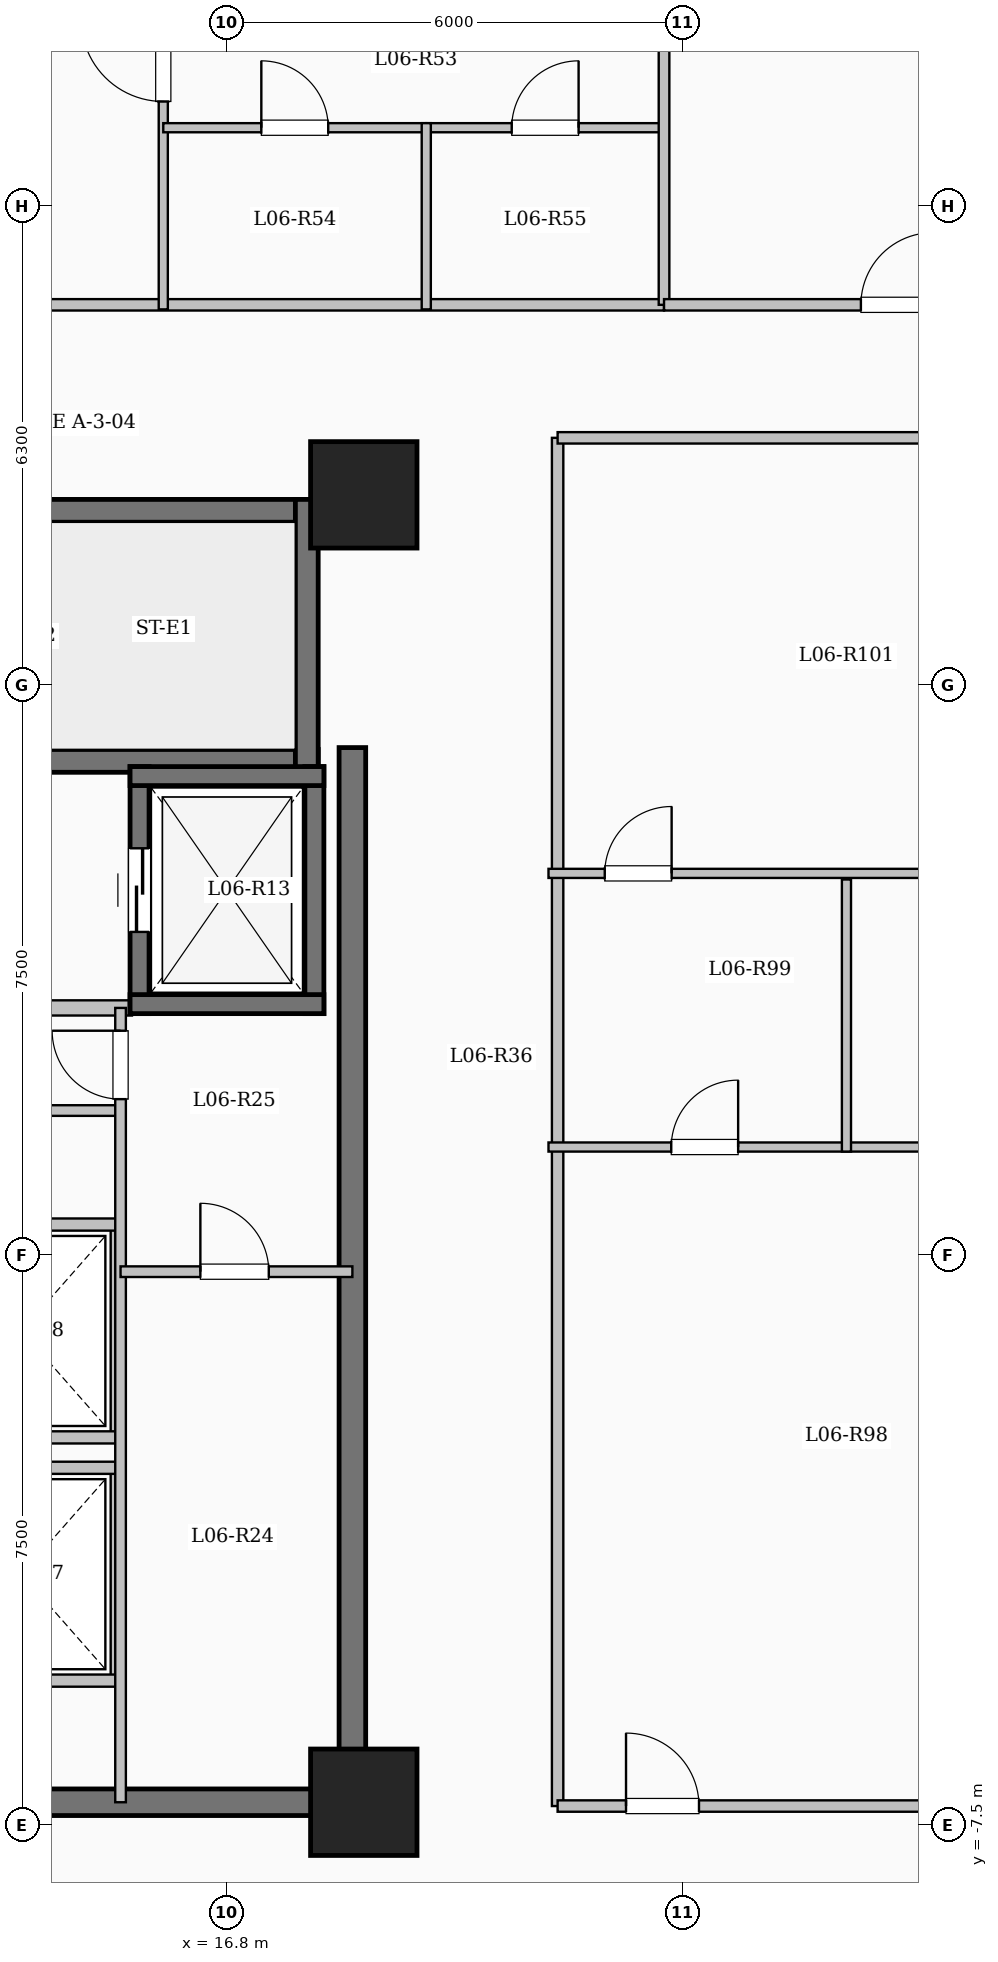
"""IFC4 building model, lengths in metres.
Left out: names, types, materials, properties, quantities, classifications, styles, units other than length and angle.
Written with IfcOpenShell. Run it as: python <this file> out.ifc"""

import sys

from ifc_helpers import new_model, si_unit, direction, frame, frame_2d, origin, origin_2d, place, context, subcontext, project, spatial, rectangle, extrude, element, fill, save


model = new_model("IFC4")
c1 = context("Model", 3, precision=1e-05, world=origin(), true_north=direction((0.0, 1.0)))
c2 = subcontext(c1, "Body", "Model", "MODEL_VIEW")
j1 = project(units=[si_unit("LENGTHUNIT", "METRE"), si_unit("PLANEANGLEUNIT", "RADIAN")], contexts=[c1])
p1 = place(None, origin())
s1 = spatial("IfcSite", under=j1, at=p1, CompositionType="ELEMENT")
p2 = place(p1, origin())
s2 = spatial("IfcBuilding", under=s1, at=p2, CompositionType="ELEMENT")
p3 = place(p2, frame((0.0, 0.0, 27.35)))
s3 = spatial("IfcBuildingStorey", under=s2, at=p3, CompositionType="ELEMENT", Elevation=27.35)
for number, where, z_axis, x_axis in (
    (1, (18.6, -7.2, 0.0), (0.0, 0.0, 1.0), (1.0, 0.0, 0.0)),
    (2, (18.6, 10.0, 0.0), (0.0, 0.0, 1.0), (1.0, 0.0, 0.0)),
):
    element("IfcColumn", number, at=place(p3, frame(where, z_axis=z_axis, x_axis=x_axis)), inside=s3, PredefinedType="COLUMN", context=c2, shape_type="SweptSolid", body=[
        extrude(rectangle(XDim=1.4, YDim=1.4, at=origin_2d()), origin(), (0.0, 0.0, 1.0), 3.35),
    ])
p4 = place(p3, frame((10.0, 9.79, 0.0), z_axis=(0.0, 0.0, 1.0), x_axis=(1.0, 0.0, 0.0)))
e3 = element("IfcWall", 3, at=p4, inside=s3, PredefinedType="SHEAR", context=c2, shape_type="SweptSolid", body=[
    extrude(rectangle(XDim=8.0, YDim=0.3, at=frame_2d((4.0, 0.0))), origin(), (0.0, 0.0, 1.0), 3.35),
])
p5 = place(p3, frame((10.0, 6.5, 0.0), z_axis=(0.0, 0.0, 1.0), x_axis=(1.0, 0.0, 0.0)))
e4 = element("IfcWall", 4, at=p5, inside=s3, PredefinedType="SHEAR", context=c2, shape_type="SweptSolid", body=[
    extrude(rectangle(XDim=8.0, YDim=0.3, at=frame_2d((4.0, 0.0))), origin(), (0.0, 0.0, 1.0), 3.35),
])
p6 = place(p5, frame((0.55, 0.0, 0.0)))
e5 = element("IfcOpeningElement", 5, at=p6, cuts=e4, PredefinedType="OPENING", context=c2, shape_type="SweptSolid", body=[
    extrude(rectangle(XDim=1.0, YDim=2.15, at=frame_2d((0.5, 1.075))), frame((0.0, 0.16, 0.0), z_axis=(0.0, -1.0, 0.0), x_axis=(1.0, 0.0, 0.0)), (0.0, 0.0, 1.0), 0.32),
])
p7 = place(p3, frame((17.85, 6.35, 0.0), z_axis=(0.0, 0.0, 1.0), x_axis=(0.0, 1.0, 0.0)))
e6 = element("IfcWall", 6, at=p7, inside=s3, PredefinedType="SHEAR", context=c2, shape_type="SweptSolid", body=[
    extrude(rectangle(XDim=3.59, YDim=0.3, at=frame_2d((1.795, 0.0))), origin(), (0.0, 0.0, 1.0), 3.35),
])
p8 = place(p3, frame((10.15, 3.25, 0.0), z_axis=(0.0, 0.0, 1.0), x_axis=(1.0, 0.0, 0.0)))
e7 = element("IfcWall", 7, at=p8, inside=s3, PredefinedType="SOLIDWALL", context=c2, shape_type="SweptSolid", body=[
    extrude(rectangle(XDim=5.4, YDim=0.2, at=frame_2d((2.7, 0.0))), origin(), (0.0, 0.0, 1.0), 3.1),
])
p9 = place(p3, frame((15.65, 3.175, 0.0), z_axis=(0.0, 0.0, 1.0), x_axis=(0.0, 1.0, 0.0)))
e8 = element("IfcWall", 8, at=p9, inside=s3, PredefinedType="SHEAR", context=c2, shape_type="SweptSolid", body=[
    extrude(rectangle(XDim=3.25, YDim=0.25, at=frame_2d((1.625, 0.0))), origin(), (0.0, 0.0, 1.0), 3.35),
])
p10 = place(p9, frame((1.075, 0.0, 0.0)))
e9 = element("IfcOpeningElement", 9, at=p10, cuts=e8, PredefinedType="OPENING", context=c2, shape_type="SweptSolid", body=[
    extrude(rectangle(XDim=1.1, YDim=2.15, at=frame_2d((0.55, 1.075))), frame((0.0, 0.135, 0.0), z_axis=(0.0, -1.0, 0.0), x_axis=(1.0, 0.0, 0.0)), (0.0, 0.0, 1.0), 0.27),
])
p11 = place(p3, frame((17.95, 3.175, 0.0), z_axis=(0.0, 0.0, 1.0), x_axis=(0.0, 1.0, 0.0)))
e10 = element("IfcWall", 10, at=p11, inside=s3, PredefinedType="SHEAR", context=c2, shape_type="SweptSolid", body=[
    extrude(rectangle(XDim=3.25, YDim=0.25, at=frame_2d((1.625, 0.0))), origin(), (0.0, 0.0, 1.0), 3.35),
])
for number, where, z_axis, x_axis in (
    (11, (15.525, 3.3, 0.0), (0.0, 0.0, 1.0), (1.0, 0.0, 0.0)),
    (12, (15.525, 6.3, 0.0), (0.0, 0.0, 1.0), (1.0, 0.0, 0.0)),
):
    element("IfcWall", number, at=place(p3, frame(where, z_axis=z_axis, x_axis=x_axis)), inside=s3, PredefinedType="SHEAR", context=c2, shape_type="SweptSolid", body=[
        extrude(rectangle(XDim=2.55, YDim=0.25, at=frame_2d((1.275, 0.0))), origin(), (0.0, 0.0, 1.0), 3.35),
    ])
p12 = place(p3, frame((15.35, -5.6, 0.0), z_axis=(0.0, 0.0, 1.0), x_axis=(0.0, 1.0, 0.0)))
e13 = element("IfcWall", 13, at=p12, inside=s3, PredefinedType="SOLIDWALL", context=c2, shape_type="SweptSolid", body=[
    extrude(rectangle(XDim=2.8, YDim=0.16, at=frame_2d((1.4, 0.0))), origin(), (0.0, 0.0, 1.0), 3.1),
])
for number, where, z_axis, x_axis in (
    (14, (12.85, -5.6, 0.0), (0.0, 0.0, 1.0), (1.0, 0.0, 0.0)),
    (15, (12.85, -2.8, 0.0), (0.0, 0.0, 1.0), (1.0, 0.0, 0.0)),
):
    element("IfcWall", number, at=place(p3, frame(where, z_axis=z_axis, x_axis=x_axis)), inside=s3, PredefinedType="SOLIDWALL", context=c2, shape_type="SweptSolid", body=[
        extrude(rectangle(XDim=2.5, YDim=0.16, at=frame_2d((1.25, 0.0))), origin(), (0.0, 0.0, 1.0), 3.1),
    ])
p13 = place(p3, frame((15.35, -2.4, 0.0), z_axis=(0.0, 0.0, 1.0), x_axis=(0.0, 1.0, 0.0)))
e16 = element("IfcWall", 16, at=p13, inside=s3, PredefinedType="SOLIDWALL", context=c2, shape_type="SweptSolid", body=[
    extrude(rectangle(XDim=2.8, YDim=0.16, at=frame_2d((1.4, 0.0))), origin(), (0.0, 0.0, 1.0), 3.1),
])
for number, where, z_axis, x_axis in (
    (17, (12.85, -2.4, 0.0), (0.0, 0.0, 1.0), (1.0, 0.0, 0.0)),
    (18, (12.85, 0.4, 0.0), (0.0, 0.0, 1.0), (1.0, 0.0, 0.0)),
):
    element("IfcWall", number, at=place(p3, frame(where, z_axis=z_axis, x_axis=x_axis)), inside=s3, PredefinedType="SOLIDWALL", context=c2, shape_type="SweptSolid", body=[
        extrude(rectangle(XDim=2.5, YDim=0.16, at=frame_2d((1.25, 0.0))), origin(), (0.0, 0.0, 1.0), 3.1),
    ])
p14 = place(p3, frame((18.45, -7.375, 0.0), z_axis=(0.0, 0.0, 1.0), x_axis=(0.0, 1.0, 0.0)))
e19 = element("IfcWall", 19, at=p14, inside=s3, PredefinedType="SHEAR", context=c2, shape_type="SweptSolid", body=[
    extrude(rectangle(XDim=14.05, YDim=0.35, at=frame_2d((7.025, 0.0))), origin(), (0.0, 0.0, 1.0), 3.35),
])
p15 = place(p3, frame((10.075, -7.2, 0.0), z_axis=(0.0, 0.0, 1.0), x_axis=(1.0, 0.0, 0.0)))
e20 = element("IfcWall", 20, at=p15, inside=s3, PredefinedType="SHEAR", context=c2, shape_type="SweptSolid", body=[
    extrude(rectangle(XDim=8.55, YDim=0.35, at=frame_2d((4.275, 0.0))), origin(), (0.0, 0.0, 1.0), 3.35),
])
p16 = place(p3, frame((12.55, 1.9, 0.0), z_axis=(0.0, 0.0, 1.0), x_axis=(1.0, 0.0, 0.0)))
e21 = element("IfcWall", 21, at=p16, inside=s3, PredefinedType="PARTITIONING", context=c2, shape_type="SweptSolid", body=[
    extrude(rectangle(XDim=2.85, YDim=0.14, at=frame_2d((1.425, 0.0))), origin(), (0.0, 0.0, 1.0), 3.1),
])
p17 = place(p3, frame((15.4, -7.2, 0.0), z_axis=(0.0, 0.0, 1.0), x_axis=(0.0, 1.0, 0.0)))
e22 = element("IfcWall", 22, at=p17, inside=s3, PredefinedType="PARTITIONING", context=c2, shape_type="SweptSolid", body=[
    extrude(rectangle(XDim=10.45, YDim=0.14, at=frame_2d((5.225, 0.0))), origin(), (0.0, 0.0, 1.0), 3.1),
])
p18 = place(p17, frame((9.25, 0.0, 0.0)))
e23 = element("IfcOpeningElement", 23, at=p18, cuts=e22, PredefinedType="OPENING", context=c2, shape_type="SweptSolid", body=[
    extrude(rectangle(XDim=0.9, YDim=2.08, at=frame_2d((0.45, 1.04))), frame((0.0, 0.08, 0.0), z_axis=(0.0, -1.0, 0.0), x_axis=(1.0, 0.0, 0.0)), (0.0, 0.0, 1.0), 0.16),
])
p19 = place(p3, frame((15.4, -0.22, 0.0), z_axis=(0.0, 0.0, 1.0), x_axis=(1.0, 0.0, 0.0)))
e24 = element("IfcWall", 24, at=p19, inside=s3, PredefinedType="PARTITIONING", context=c2, shape_type="SweptSolid", body=[
    extrude(rectangle(XDim=3.05, YDim=0.14, at=frame_2d((1.525, 0.0))), origin(), (0.0, 0.0, 1.0), 3.1),
])
p20 = place(p19, frame((1.05, 0.0, 0.0)))
e25 = element("IfcOpeningElement", 25, at=p20, cuts=e24, PredefinedType="OPENING", context=c2, shape_type="SweptSolid", body=[
    extrude(rectangle(XDim=0.9, YDim=2.08, at=frame_2d((0.45, 1.04))), frame((0.0, 0.08, 0.0), z_axis=(0.0, -1.0, 0.0), x_axis=(1.0, 0.0, 0.0)), (0.0, 0.0, 1.0), 0.16),
])
p21 = place(p3, frame((3.85, 12.5, 0.0), z_axis=(0.0, 0.0, 1.0), x_axis=(1.0, 0.0, 0.0)))
e26 = element("IfcWall", 26, at=p21, inside=s3, PredefinedType="PARTITIONING", context=c2, shape_type="SweptSolid", body=[
    extrude(rectangle(XDim=18.7, YDim=0.15, at=frame_2d((9.35, 0.0))), origin(), (0.0, 0.0, 1.0), 3.1),
])
p22 = place(p21, frame((0.7, 0.0, 0.0)))
e27 = element("IfcOpeningElement", 27, at=p22, cuts=e26, PredefinedType="OPENING", context=c2, shape_type="SweptSolid", body=[
    extrude(rectangle(XDim=0.96, YDim=2.15, at=frame_2d((0.48, 1.075))), frame((0.0, 0.085, 0.0), z_axis=(0.0, -1.0, 0.0), x_axis=(1.0, 0.0, 0.0)), (0.0, 0.0, 1.0), 0.17),
])
p23 = place(p21, frame((8.4, 0.0, 0.0)))
e28 = element("IfcOpeningElement", 28, at=p23, cuts=e26, PredefinedType="OPENING", context=c2, shape_type="SweptSolid", body=[
    extrude(rectangle(XDim=0.96, YDim=2.15, at=frame_2d((0.48, 1.075))), frame((0.0, 0.085, 0.0), z_axis=(0.0, -1.0, 0.0), x_axis=(1.0, 0.0, 0.0)), (0.0, 0.0, 1.0), 0.17),
])
p24 = place(p3, frame((21.15, -7.25, 0.0), z_axis=(0.0, 0.0, 1.0), x_axis=(0.0, 1.0, 0.0)))
e29 = element("IfcWall", 29, at=p24, inside=s3, PredefinedType="PARTITIONING", context=c2, shape_type="SweptSolid", body=[
    extrude(rectangle(XDim=18.0, YDim=0.15, at=frame_2d((9.0, 0.0))), origin(), (0.0, 0.0, 1.0), 2.585),
])
p25 = place(p3, frame((15.962, 12.44, 0.0), z_axis=(0.0, 0.0, 1.0), x_axis=(0.0, 1.0, 0.0)))
e30 = element("IfcWall", 30, at=p25, inside=s3, PredefinedType="PARTITIONING", context=c2, shape_type="SweptSolid", body=[
    extrude(rectangle(XDim=11.16, YDim=0.12, at=frame_2d((5.58, 0.0))), origin(), (0.0, 0.0, 1.0), 3.1),
])
p26 = place(p25, frame((2.735, 0.0, 0.0)))
e31 = element("IfcOpeningElement", 31, at=p26, cuts=e30, PredefinedType="OPENING", context=c2, shape_type="SweptSolid", body=[
    extrude(rectangle(XDim=1.08, YDim=2.15, at=frame_2d((0.54, 1.075))), frame((0.0, 0.07, 0.0), z_axis=(0.0, -1.0, 0.0), x_axis=(1.0, 0.0, 0.0)), (0.0, 0.0, 1.0), 0.14),
])
p27 = place(p3, frame((15.962, 14.83, 0.0), z_axis=(0.0, 0.0, 1.0), x_axis=(1.0, 0.0, 0.0)))
e32 = element("IfcWall", 32, at=p27, inside=s3, PredefinedType="PARTITIONING", context=c2, shape_type="SweptSolid", body=[
    extrude(rectangle(XDim=3.46, YDim=0.12, at=frame_2d((1.73, 0.0))), origin(), (0.0, 0.0, 1.0), 3.1),
])
p28 = place(p27, frame((1.29, 0.0, 0.0)))
e33 = element("IfcOpeningElement", 33, at=p28, cuts=e32, PredefinedType="OPENING", context=c2, shape_type="SweptSolid", body=[
    extrude(rectangle(XDim=0.88, YDim=2.1, at=frame_2d((0.44, 1.05))), frame((0.0, 0.07, 0.0), z_axis=(0.0, -1.0, 0.0), x_axis=(1.0, 0.0, 0.0)), (0.0, 0.0, 1.0), 0.14),
])
p29 = place(p3, frame((19.422, 14.83, 0.0), z_axis=(0.0, 0.0, 1.0), x_axis=(1.0, 0.0, 0.0)))
e34 = element("IfcWall", 34, at=p29, inside=s3, PredefinedType="PARTITIONING", context=c2, shape_type="SweptSolid", body=[
    extrude(rectangle(XDim=3.128, YDim=0.12, at=frame_2d((1.564, 0.0))), origin(), (0.0, 0.0, 1.0), 3.1),
])
p30 = place(p29, frame((1.124, 0.0, 0.0)))
e35 = element("IfcOpeningElement", 35, at=p30, cuts=e34, PredefinedType="OPENING", context=c2, shape_type="SweptSolid", body=[
    extrude(rectangle(XDim=0.88, YDim=2.1, at=frame_2d((0.44, 1.05))), frame((0.0, 0.07, 0.0), z_axis=(0.0, -1.0, 0.0), x_axis=(1.0, 0.0, 0.0)), (0.0, 0.0, 1.0), 0.14),
])
p31 = place(p3, frame((19.422, 12.44, 0.0), z_axis=(0.0, 0.0, 1.0), x_axis=(0.0, 1.0, 0.0)))
e36 = element("IfcWall", 36, at=p31, inside=s3, PredefinedType="PARTITIONING", context=c2, shape_type="SweptSolid", body=[
    extrude(rectangle(XDim=2.45, YDim=0.12, at=frame_2d((1.225, 0.0))), origin(), (0.0, 0.0, 1.0), 3.1),
])
p32 = place(p3, frame((21.15, -7.25, 0.0), z_axis=(0.0, 0.0, 1.0), x_axis=(1.0, 0.0, 0.0)))
e37 = element("IfcWall", 37, at=p32, inside=s3, PredefinedType="PARTITIONING", context=c2, shape_type="SweptSolid", body=[
    extrude(rectangle(XDim=7.53, YDim=0.15, at=frame_2d((3.765, 0.0))), origin(), (0.0, 0.0, 1.0), 3.1),
])
p33 = place(p32, frame((0.9, 0.0, 0.0)))
e38 = element("IfcOpeningElement", 38, at=p33, cuts=e37, PredefinedType="OPENING", context=c2, shape_type="SweptSolid", body=[
    extrude(rectangle(XDim=0.96, YDim=2.15, at=frame_2d((0.48, 1.075))), frame((0.0, 0.085, 0.0), z_axis=(0.0, -1.0, 0.0), x_axis=(1.0, 0.0, 0.0)), (0.0, 0.0, 1.0), 0.17),
])
p34 = place(p3, frame((21.15, 10.75, 0.0), z_axis=(0.0, 0.0, 1.0), x_axis=(1.0, 0.0, 0.0)))
e39 = element("IfcWall", 39, at=p34, inside=s3, PredefinedType="PARTITIONING", context=c2, shape_type="SweptSolid", body=[
    extrude(rectangle(XDim=7.53, YDim=0.15, at=frame_2d((3.765, 0.0))), origin(), (0.0, 0.0, 1.0), 3.1),
])
p35 = place(p3, frame((22.55, 12.5, 0.0), z_axis=(0.0, 0.0, 1.0), x_axis=(0.0, 1.0, 0.0)))
e40 = element("IfcWall", 40, at=p35, inside=s3, PredefinedType="PARTITIONING", context=c2, shape_type="SweptSolid", body=[
    extrude(rectangle(XDim=6.55, YDim=0.14, at=frame_2d((3.275, 0.0))), origin(), (0.0, 0.0, 1.0), 3.1),
])
p36 = place(p3, frame((22.55, 12.5, 0.0), z_axis=(0.0, 0.0, 1.0), x_axis=(1.0, 0.0, 0.0)))
e41 = element("IfcWall", 41, at=p36, inside=s3, PredefinedType="PARTITIONING", context=c2, shape_type="SweptSolid", body=[
    extrude(rectangle(XDim=6.13, YDim=0.15, at=frame_2d((3.065, 0.0))), origin(), (0.0, 0.0, 1.0), 3.1),
])
p37 = place(p36, frame((2.59, 0.0, 0.0)))
e42 = element("IfcOpeningElement", 42, at=p37, cuts=e41, PredefinedType="OPENING", context=c2, shape_type="SweptSolid", body=[
    extrude(rectangle(XDim=0.95, YDim=2.15, at=frame_2d((0.475, 1.075))), frame((0.0, 0.085, 0.0), z_axis=(0.0, -1.0, 0.0), x_axis=(1.0, 0.0, 0.0)), (0.0, 0.0, 1.0), 0.17),
])
p38 = place(p3, frame((21.03, 1.42, 0.0), z_axis=(0.0, 0.0, 1.0), x_axis=(1.0, 0.0, 0.0)))
e43 = element("IfcWall", 43, at=p38, inside=s3, PredefinedType="PARTITIONING", context=c2, shape_type="SweptSolid", body=[
    extrude(rectangle(XDim=7.77, YDim=0.12, at=frame_2d((3.885, 0.0))), origin(), (0.0, 0.0, 1.0), 3.1),
])
p39 = place(p38, frame((1.615, 0.0, 0.0)))
e44 = element("IfcOpeningElement", 44, at=p39, cuts=e43, PredefinedType="OPENING", context=c2, shape_type="SweptSolid", body=[
    extrude(rectangle(XDim=0.88, YDim=2.1, at=frame_2d((0.44, 1.05))), frame((0.0, 0.07, 0.0), z_axis=(0.0, -1.0, 0.0), x_axis=(1.0, 0.0, 0.0)), (0.0, 0.0, 1.0), 0.14),
])
p40 = place(p38, frame((5.345, 0.0, 0.0)))
e45 = element("IfcOpeningElement", 45, at=p40, cuts=e43, PredefinedType="OPENING", context=c2, shape_type="SweptSolid", body=[
    extrude(rectangle(XDim=0.88, YDim=2.1, at=frame_2d((0.44, 1.05))), frame((0.0, 0.07, 0.0), z_axis=(0.0, -1.0, 0.0), x_axis=(1.0, 0.0, 0.0)), (0.0, 0.0, 1.0), 0.14),
])
p41 = place(p3, frame((21.03, 5.02, 0.0), z_axis=(0.0, 0.0, 1.0), x_axis=(1.0, 0.0, 0.0)))
e46 = element("IfcWall", 46, at=p41, inside=s3, PredefinedType="PARTITIONING", context=c2, shape_type="SweptSolid", body=[
    extrude(rectangle(XDim=7.77, YDim=0.12, at=frame_2d((3.885, 0.0))), origin(), (0.0, 0.0, 1.0), 3.1),
])
p42 = place(p41, frame((0.74, 0.0, 0.0)))
e47 = element("IfcOpeningElement", 47, at=p42, cuts=e46, PredefinedType="OPENING", context=c2, shape_type="SweptSolid", body=[
    extrude(rectangle(XDim=0.88, YDim=2.1, at=frame_2d((0.44, 1.05))), frame((0.0, 0.07, 0.0), z_axis=(0.0, -1.0, 0.0), x_axis=(1.0, 0.0, 0.0)), (0.0, 0.0, 1.0), 0.14),
])
p43 = place(p3, frame((24.95, 1.36, 0.0), z_axis=(0.0, 0.0, 1.0), x_axis=(0.0, 1.0, 0.0)))
e48 = element("IfcWall", 48, at=p43, inside=s3, PredefinedType="PARTITIONING", context=c2, shape_type="SweptSolid", body=[
    extrude(rectangle(XDim=3.58, YDim=0.12, at=frame_2d((1.79, 0.0))), origin(), (0.0, 0.0, 1.0), 3.1),
])
p44 = place(p10, origin())
e49 = element("IfcDoor", 49, at=p44, inside=s3, OperationType="SLIDING_TO_LEFT", PredefinedType="DOOR", context=c2, shape_type="SweptSolid", body=[
    extrude(rectangle(XDim=1.1, YDim=2.15, at=frame_2d((0.55, 1.075))), frame((0.0, 0.025, 0.0), z_axis=(0.0, -1.0, 0.0), x_axis=(1.0, 0.0, 0.0)), (0.0, 0.0, 1.0), 0.05),
])
fill(e9, e49)
p45 = place(p18, origin())
e50 = element("IfcDoor", 50, at=p45, inside=s3, OperationType="SINGLE_SWING_RIGHT", PredefinedType="DOOR", context=c2, shape_type="SweptSolid", body=[
    extrude(rectangle(XDim=0.9, YDim=2.08, at=frame_2d((0.45, 1.04))), frame((0.0, 0.025, 0.0), z_axis=(0.0, -1.0, 0.0), x_axis=(1.0, 0.0, 0.0)), (0.0, 0.0, 1.0), 0.05),
])
fill(e23, e50)
p46 = place(p20, origin())
e51 = element("IfcDoor", 51, at=p46, inside=s3, OperationType="SINGLE_SWING_LEFT", PredefinedType="DOOR", context=c2, shape_type="SweptSolid", body=[
    extrude(rectangle(XDim=0.9, YDim=2.08, at=frame_2d((0.45, 1.04))), frame((0.0, 0.025, 0.0), z_axis=(0.0, -1.0, 0.0), x_axis=(1.0, 0.0, 0.0)), (0.0, 0.0, 1.0), 0.05),
])
fill(e25, e51)
p47 = place(p26, origin())
e52 = element("IfcDoor", 52, at=p47, inside=s3, OperationType="SINGLE_SWING_RIGHT", PredefinedType="DOOR", context=c2, shape_type="SweptSolid", body=[
    extrude(rectangle(XDim=1.08, YDim=2.15, at=frame_2d((0.54, 1.075))), frame((0.0, 0.025, 0.0), z_axis=(0.0, -1.0, 0.0), x_axis=(1.0, 0.0, 0.0)), (0.0, 0.0, 1.0), 0.05),
])
fill(e31, e52)
p48 = place(p28, origin())
e53 = element("IfcDoor", 53, at=p48, inside=s3, OperationType="SINGLE_SWING_LEFT", PredefinedType="DOOR", context=c2, shape_type="SweptSolid", body=[
    extrude(rectangle(XDim=0.88, YDim=2.1, at=frame_2d((0.44, 1.05))), frame((0.0, 0.025, 0.0), z_axis=(0.0, -1.0, 0.0), x_axis=(1.0, 0.0, 0.0)), (0.0, 0.0, 1.0), 0.05),
])
fill(e33, e53)
p49 = place(p30, origin())
e54 = element("IfcDoor", 54, at=p49, inside=s3, OperationType="SINGLE_SWING_RIGHT", PredefinedType="DOOR", context=c2, shape_type="SweptSolid", body=[
    extrude(rectangle(XDim=0.88, YDim=2.1, at=frame_2d((0.44, 1.05))), frame((0.0, 0.025, 0.0), z_axis=(0.0, -1.0, 0.0), x_axis=(1.0, 0.0, 0.0)), (0.0, 0.0, 1.0), 0.05),
])
fill(e35, e54)
p50 = place(p37, origin())
e55 = element("IfcDoor", 55, at=p50, inside=s3, OperationType="SINGLE_SWING_RIGHT", PredefinedType="DOOR", context=c2, shape_type="SweptSolid", body=[
    extrude(rectangle(XDim=0.95, YDim=2.15, at=frame_2d((0.475, 1.075))), frame((0.0, 0.025, 0.0), z_axis=(0.0, -1.0, 0.0), x_axis=(1.0, 0.0, 0.0)), (0.0, 0.0, 1.0), 0.05),
])
fill(e42, e55)
p51 = place(p33, origin())
e56 = element("IfcDoor", 56, at=p51, inside=s3, OperationType="SINGLE_SWING_LEFT", PredefinedType="DOOR", context=c2, shape_type="SweptSolid", body=[
    extrude(rectangle(XDim=0.96, YDim=2.15, at=frame_2d((0.48, 1.075))), frame((0.0, 0.025, 0.0), z_axis=(0.0, -1.0, 0.0), x_axis=(1.0, 0.0, 0.0)), (0.0, 0.0, 1.0), 0.05),
])
fill(e38, e56)
p52 = place(p39, origin())
e57 = element("IfcDoor", 57, at=p52, inside=s3, OperationType="SINGLE_SWING_RIGHT", PredefinedType="DOOR", context=c2, shape_type="SweptSolid", body=[
    extrude(rectangle(XDim=0.88, YDim=2.1, at=frame_2d((0.44, 1.05))), frame((0.0, 0.025, 0.0), z_axis=(0.0, -1.0, 0.0), x_axis=(1.0, 0.0, 0.0)), (0.0, 0.0, 1.0), 0.05),
])
fill(e44, e57)
p53 = place(p42, origin())
e58 = element("IfcDoor", 58, at=p53, inside=s3, OperationType="SINGLE_SWING_RIGHT", PredefinedType="DOOR", context=c2, shape_type="SweptSolid", body=[
    extrude(rectangle(XDim=0.88, YDim=2.1, at=frame_2d((0.44, 1.05))), frame((0.0, 0.025, 0.0), z_axis=(0.0, -1.0, 0.0), x_axis=(1.0, 0.0, 0.0)), (0.0, 0.0, 1.0), 0.05),
])
fill(e47, e58)
save(model, sys.argv[1])
